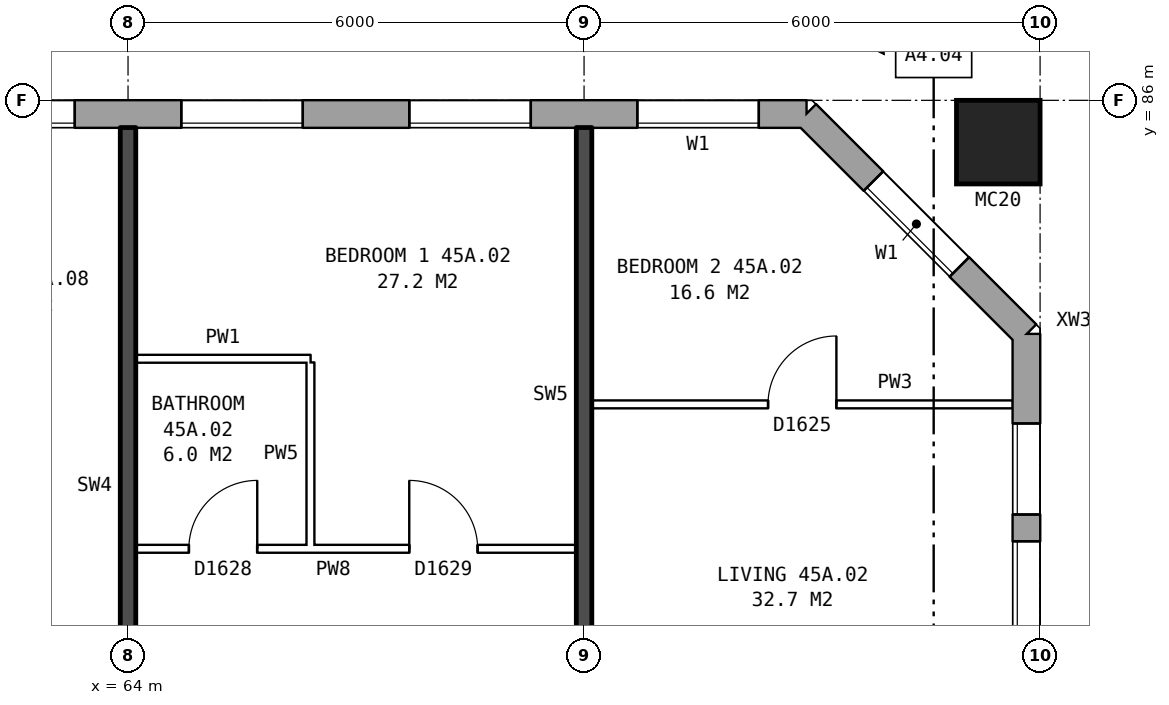
"""IFC4 building model, lengths in metres.
Left out: names, types, materials, properties, quantities, classifications, styles, units other than length and angle.
Written with IfcOpenShell. Run it as: python <this file> out.ifc"""

import sys

from ifc_helpers import new_model, si_unit, direction, frame, frame_2d, origin, origin_2d, place, context, subcontext, project, spatial, rectangle, hollow_rectangle, extrude, element, fill, save


model = new_model("IFC4")
c1 = context("Model", 3, precision=1e-05, world=origin(), true_north=direction((0.0, 1.0)))
c2 = subcontext(c1, "Body", "Model", "MODEL_VIEW")
j1 = project(units=[si_unit("LENGTHUNIT", "METRE"), si_unit("PLANEANGLEUNIT", "RADIAN")], contexts=[c1])
p1 = place(None, origin())
s1 = spatial("IfcSite", under=j1, at=p1, CompositionType="ELEMENT")
p2 = place(p1, origin())
s2 = spatial("IfcBuilding", under=s1, at=p2, CompositionType="ELEMENT")
p3 = place(p2, frame((0.0, 0.0, 160.9)))
s3 = spatial("IfcBuildingStorey", under=s2, at=p3, CompositionType="ELEMENT", Elevation=160.9)
p4 = place(p3, frame((75.45, 85.45, 0.0), z_axis=(0.0, 0.0, 1.0), x_axis=(1.0, 0.0, 0.0)))
e1 = element("IfcColumn", 1, at=p4, inside=s3, PredefinedType="COLUMN", context=c2, shape_type="SweptSolid", body=[
    extrude(hollow_rectangle(XDim=1.1, YDim=1.1, WallThickness=0.06, at=origin_2d()), origin(), (0.0, 0.0, 1.0), 3.1),
])
p5 = place(p3, frame((75.82, 57.075, 0.0), z_axis=(0.0, 0.0, 1.0), x_axis=(0.0, 1.0, 0.0)))
e2 = element("IfcWall", 2, at=p5, inside=s3, PredefinedType="STANDARD", context=c2, shape_type="SweptSolid", body=[
    extrude(rectangle(XDim=25.851, YDim=0.36, at=frame_2d((12.925, 0.0))), origin(), (0.0, 0.0, 1.0), 2.85),
])
p6 = place(p5, frame((1.075, 0.0, 0.8)))
e3 = element("IfcOpeningElement", 3, at=p6, cuts=e2, PredefinedType="OPENING", context=c2, shape_type="SweptSolid", body=[
    extrude(rectangle(XDim=1.2, YDim=1.8, at=frame_2d((0.6, 0.9))), frame((0.0, 0.19, 0.0), z_axis=(0.0, -1.0, 0.0), x_axis=(1.0, 0.0, 0.0)), (0.0, 0.0, 1.0), 0.38),
])
p7 = place(p5, frame((2.575, 0.0, 0.8)))
e4 = element("IfcOpeningElement", 4, at=p7, cuts=e2, PredefinedType="OPENING", context=c2, shape_type="SweptSolid", body=[
    extrude(rectangle(XDim=1.2, YDim=0.9, at=frame_2d((0.6, 0.45))), frame((0.0, 0.19, 0.0), z_axis=(0.0, -1.0, 0.0), x_axis=(1.0, 0.0, 0.0)), (0.0, 0.0, 1.0), 0.38),
])
p8 = place(p5, frame((19.475, 0.0, 1.7)))
e5 = element("IfcOpeningElement", 5, at=p8, cuts=e2, PredefinedType="OPENING", context=c2, shape_type="SweptSolid", body=[
    extrude(rectangle(XDim=1.4, YDim=0.9, at=frame_2d((0.7, 0.45))), frame((0.0, 0.19, 0.0), z_axis=(0.0, -1.0, 0.0), x_axis=(1.0, 0.0, 0.0)), (0.0, 0.0, 1.0), 0.38),
])
p9 = place(p5, frame((21.925, 0.0, 0.8)))
e6 = element("IfcOpeningElement", 6, at=p9, cuts=e2, PredefinedType="OPENING", context=c2, shape_type="SweptSolid", body=[
    extrude(rectangle(XDim=1.2, YDim=0.9, at=frame_2d((0.6, 0.45))), frame((0.0, 0.19, 0.0), z_axis=(0.0, -1.0, 0.0), x_axis=(1.0, 0.0, 0.0)), (0.0, 0.0, 1.0), 0.38),
])
p10 = place(p5, frame((4.975, 0.0, 1.7)))
e7 = element("IfcOpeningElement", 7, at=p10, cuts=e2, PredefinedType="OPENING", context=c2, shape_type="SweptSolid", body=[
    extrude(rectangle(XDim=1.4, YDim=0.9, at=frame_2d((0.7, 0.45))), frame((0.0, 0.19, 0.0), z_axis=(0.0, -1.0, 0.0), x_axis=(1.0, 0.0, 0.0)), (0.0, 0.0, 1.0), 0.38),
])
p11 = place(p5, frame((23.475, 0.0, 0.8)))
e8 = element("IfcOpeningElement", 8, at=p11, cuts=e2, PredefinedType="OPENING", context=c2, shape_type="SweptSolid", body=[
    extrude(rectangle(XDim=1.2, YDim=1.8, at=frame_2d((0.6, 0.9))), frame((0.0, 0.19, 0.0), z_axis=(0.0, -1.0, 0.0), x_axis=(1.0, 0.0, 0.0)), (0.0, 0.0, 1.0), 0.38),
])
p12 = place(p3, frame((75.82, 82.925, 0.0), z_axis=(0.0, 0.0, 1.0), x_axis=(-0.707106781187, 0.707106781187, 0.0)))
e9 = element("IfcWall", 9, at=p12, inside=s3, PredefinedType="STANDARD", context=c2, shape_type="SweptSolid", body=[
    extrude(rectangle(XDim=4.094, YDim=0.36, at=frame_2d((2.047, 0.0))), origin(), (0.0, 0.0, 1.0), 2.85),
])
p13 = place(p12, frame((1.247, 0.0, 0.8)))
e10 = element("IfcOpeningElement", 10, at=p13, cuts=e9, PredefinedType="OPENING", context=c2, shape_type="SweptSolid", body=[
    extrude(rectangle(XDim=1.6, YDim=1.8, at=frame_2d((0.8, 0.9))), frame((0.0, 0.19, 0.0), z_axis=(0.0, -1.0, 0.0), x_axis=(1.0, 0.0, 0.0)), (0.0, 0.0, 1.0), 0.38),
])
p14 = place(p3, frame((72.925, 85.82, 0.0), z_axis=(0.0, 0.0, 1.0), x_axis=(-1.0, 0.0, 0.0)))
e11 = element("IfcWall", 11, at=p14, inside=s3, PredefinedType="STANDARD", context=c2, shape_type="SweptSolid", body=[
    extrude(rectangle(XDim=41.351, YDim=0.36, at=frame_2d((20.675, 0.0))), origin(), (0.0, 0.0, 1.0), 2.85),
])
p15 = place(p14, frame((0.625, 0.0, 0.8)))
e12 = element("IfcOpeningElement", 12, at=p15, cuts=e11, PredefinedType="OPENING", context=c2, shape_type="SweptSolid", body=[
    extrude(rectangle(XDim=1.6, YDim=1.8, at=frame_2d((0.8, 0.9))), frame((0.0, 0.19, 0.0), z_axis=(0.0, -1.0, 0.0), x_axis=(1.0, 0.0, 0.0)), (0.0, 0.0, 1.0), 0.38),
])
p16 = place(p14, frame((3.625, 0.0, 0.8)))
e13 = element("IfcOpeningElement", 13, at=p16, cuts=e11, PredefinedType="OPENING", context=c2, shape_type="SweptSolid", body=[
    extrude(rectangle(XDim=1.6, YDim=1.8, at=frame_2d((0.8, 0.9))), frame((0.0, 0.19, 0.0), z_axis=(0.0, -1.0, 0.0), x_axis=(1.0, 0.0, 0.0)), (0.0, 0.0, 1.0), 0.38),
])
p17 = place(p14, frame((6.625, 0.0, 0.8)))
e14 = element("IfcOpeningElement", 14, at=p17, cuts=e11, PredefinedType="OPENING", context=c2, shape_type="SweptSolid", body=[
    extrude(rectangle(XDim=1.6, YDim=1.8, at=frame_2d((0.8, 0.9))), frame((0.0, 0.19, 0.0), z_axis=(0.0, -1.0, 0.0), x_axis=(1.0, 0.0, 0.0)), (0.0, 0.0, 1.0), 0.38),
])
p18 = place(p14, frame((9.625, 0.0, 0.8)))
e15 = element("IfcOpeningElement", 15, at=p18, cuts=e11, PredefinedType="OPENING", context=c2, shape_type="SweptSolid", body=[
    extrude(rectangle(XDim=1.6, YDim=1.8, at=frame_2d((0.8, 0.9))), frame((0.0, 0.19, 0.0), z_axis=(0.0, -1.0, 0.0), x_axis=(1.0, 0.0, 0.0)), (0.0, 0.0, 1.0), 0.38),
])
p19 = place(p14, frame((12.075, 0.0, 0.8)))
e16 = element("IfcOpeningElement", 16, at=p19, cuts=e11, PredefinedType="OPENING", context=c2, shape_type="SweptSolid", body=[
    extrude(rectangle(XDim=1.6, YDim=1.8, at=frame_2d((0.8, 0.9))), frame((0.0, 0.19, 0.0), z_axis=(0.0, -1.0, 0.0), x_axis=(1.0, 0.0, 0.0)), (0.0, 0.0, 1.0), 0.38),
])
p20 = place(p14, frame((15.375, 0.0, 0.25)))
e17 = element("IfcOpeningElement", 17, at=p20, cuts=e11, PredefinedType="OPENING", context=c2, shape_type="SweptSolid", body=[
    extrude(rectangle(XDim=0.8, YDim=0.9, at=frame_2d((0.4, 0.45))), frame((0.0, 0.19, 0.0), z_axis=(0.0, -1.0, 0.0), x_axis=(1.0, 0.0, 0.0)), (0.0, 0.0, 1.0), 0.38),
])
p21 = place(p14, frame((18.625, 0.0, 0.8)))
e18 = element("IfcOpeningElement", 18, at=p21, cuts=e11, PredefinedType="OPENING", context=c2, shape_type="SweptSolid", body=[
    extrude(rectangle(XDim=1.6, YDim=1.8, at=frame_2d((0.8, 0.9))), frame((0.0, 0.19, 0.0), z_axis=(0.0, -1.0, 0.0), x_axis=(1.0, 0.0, 0.0)), (0.0, 0.0, 1.0), 0.38),
])
p22 = place(p14, frame((21.625, 0.0, 0.8)))
e19 = element("IfcOpeningElement", 19, at=p22, cuts=e11, PredefinedType="OPENING", context=c2, shape_type="SweptSolid", body=[
    extrude(rectangle(XDim=1.6, YDim=1.8, at=frame_2d((0.8, 0.9))), frame((0.0, 0.19, 0.0), z_axis=(0.0, -1.0, 0.0), x_axis=(1.0, 0.0, 0.0)), (0.0, 0.0, 1.0), 0.38),
])
p23 = place(p14, frame((24.075, 0.0, 0.35)))
e20 = element("IfcOpeningElement", 20, at=p23, cuts=e11, PredefinedType="OPENING", context=c2, shape_type="SweptSolid", body=[
    extrude(rectangle(XDim=1.0, YDim=1.5, at=frame_2d((0.5, 0.75))), frame((0.0, 0.19, 0.0), z_axis=(0.0, -1.0, 0.0), x_axis=(1.0, 0.0, 0.0)), (0.0, 0.0, 1.0), 0.38),
])
p24 = place(p14, frame((27.625, 0.0, 0.8)))
e21 = element("IfcOpeningElement", 21, at=p24, cuts=e11, PredefinedType="OPENING", context=c2, shape_type="SweptSolid", body=[
    extrude(rectangle(XDim=1.6, YDim=1.8, at=frame_2d((0.8, 0.9))), frame((0.0, 0.19, 0.0), z_axis=(0.0, -1.0, 0.0), x_axis=(1.0, 0.0, 0.0)), (0.0, 0.0, 1.0), 0.38),
])
p25 = place(p14, frame((30.625, 0.0, 0.8)))
e22 = element("IfcOpeningElement", 22, at=p25, cuts=e11, PredefinedType="OPENING", context=c2, shape_type="SweptSolid", body=[
    extrude(rectangle(XDim=1.6, YDim=1.8, at=frame_2d((0.8, 0.9))), frame((0.0, 0.19, 0.0), z_axis=(0.0, -1.0, 0.0), x_axis=(1.0, 0.0, 0.0)), (0.0, 0.0, 1.0), 0.38),
])
p26 = place(p14, frame((33.625, 0.0, 0.8)))
e23 = element("IfcOpeningElement", 23, at=p26, cuts=e11, PredefinedType="OPENING", context=c2, shape_type="SweptSolid", body=[
    extrude(rectangle(XDim=1.6, YDim=1.8, at=frame_2d((0.8, 0.9))), frame((0.0, 0.19, 0.0), z_axis=(0.0, -1.0, 0.0), x_axis=(1.0, 0.0, 0.0)), (0.0, 0.0, 1.0), 0.38),
])
p27 = place(p14, frame((36.625, 0.0, 0.8)))
e24 = element("IfcOpeningElement", 24, at=p27, cuts=e11, PredefinedType="OPENING", context=c2, shape_type="SweptSolid", body=[
    extrude(rectangle(XDim=1.6, YDim=1.8, at=frame_2d((0.8, 0.9))), frame((0.0, 0.19, 0.0), z_axis=(0.0, -1.0, 0.0), x_axis=(1.0, 0.0, 0.0)), (0.0, 0.0, 1.0), 0.38),
])
p28 = place(p14, frame((13.975, 0.0, 1.5)))
e25 = element("IfcOpeningElement", 25, at=p28, cuts=e11, PredefinedType="OPENING", context=c2, shape_type="SweptSolid", body=[
    extrude(rectangle(XDim=0.6, YDim=0.9, at=frame_2d((0.3, 0.45))), frame((0.0, 0.19, 0.0), z_axis=(0.0, -1.0, 0.0), x_axis=(1.0, 0.0, 0.0)), (0.0, 0.0, 1.0), 0.38),
])
p29 = place(p14, frame((16.525, 0.0, 0.25)))
e26 = element("IfcOpeningElement", 26, at=p29, cuts=e11, PredefinedType="OPENING", context=c2, shape_type="SweptSolid", body=[
    extrude(rectangle(XDim=1.2, YDim=1.8, at=frame_2d((0.6, 0.9))), frame((0.0, 0.19, 0.0), z_axis=(0.0, -1.0, 0.0), x_axis=(1.0, 0.0, 0.0)), (0.0, 0.0, 1.0), 0.38),
])
p30 = place(p14, frame((25.375, 0.0, 0.25)))
e27 = element("IfcOpeningElement", 27, at=p30, cuts=e11, PredefinedType="OPENING", context=c2, shape_type="SweptSolid", body=[
    extrude(rectangle(XDim=0.6, YDim=0.9, at=frame_2d((0.3, 0.45))), frame((0.0, 0.19, 0.0), z_axis=(0.0, -1.0, 0.0), x_axis=(1.0, 0.0, 0.0)), (0.0, 0.0, 1.0), 0.38),
])
p31 = place(p3, frame((64.1, 80.1, 0.0), z_axis=(0.0, 0.0, 1.0), x_axis=(1.0, 0.0, 0.0)))
e28 = element("IfcWall", 28, at=p31, inside=s3, PredefinedType="PARTITIONING", context=c2, shape_type="SweptSolid", body=[
    extrude(rectangle(XDim=5.8, YDim=0.1, at=frame_2d((2.9, 0.0))), origin(), (0.0, 0.0, 1.0), 2.85),
])
p32 = place(p31, frame((3.6, 0.0, 0.0)))
e29 = element("IfcOpeningElement", 29, at=p32, cuts=e28, PredefinedType="OPENING", context=c2, shape_type="SweptSolid", body=[
    extrude(rectangle(XDim=0.9, YDim=2.1, at=frame_2d((0.45, 1.05))), frame((0.0, 0.06, 0.0), z_axis=(0.0, -1.0, 0.0), x_axis=(1.0, 0.0, 0.0)), (0.0, 0.0, 1.0), 0.12),
])
p33 = place(p31, frame((0.7, 0.0, 0.0)))
e30 = element("IfcOpeningElement", 30, at=p33, cuts=e28, PredefinedType="OPENING", context=c2, shape_type="SweptSolid", body=[
    extrude(rectangle(XDim=0.9, YDim=2.1, at=frame_2d((0.45, 1.05))), frame((0.0, 0.06, 0.0), z_axis=(0.0, -1.0, 0.0), x_axis=(1.0, 0.0, 0.0)), (0.0, 0.0, 1.0), 0.12),
])
p34 = place(p3, frame((70.1, 82.0, 0.0), z_axis=(0.0, 0.0, 1.0), x_axis=(1.0, 0.0, 0.0)))
e31 = element("IfcWall", 31, at=p34, inside=s3, PredefinedType="PARTITIONING", context=c2, shape_type="SweptSolid", body=[
    extrude(rectangle(XDim=5.54, YDim=0.1, at=frame_2d((2.77, 0.0))), origin(), (0.0, 0.0, 1.0), 2.85),
])
p35 = place(p34, frame((2.32, 0.0, 0.0)))
e32 = element("IfcOpeningElement", 32, at=p35, cuts=e31, PredefinedType="OPENING", context=c2, shape_type="SweptSolid", body=[
    extrude(rectangle(XDim=0.9, YDim=2.1, at=frame_2d((0.45, 1.05))), frame((0.0, 0.06, 0.0), z_axis=(0.0, -1.0, 0.0), x_axis=(1.0, 0.0, 0.0)), (0.0, 0.0, 1.0), 0.12),
])
p36 = place(p3, frame((64.1, 82.6, 0.0), z_axis=(0.0, 0.0, 1.0), x_axis=(1.0, 0.0, 0.0)))
e33 = element("IfcWall", 33, at=p36, inside=s3, PredefinedType="PARTITIONING", context=c2, shape_type="SweptSolid", body=[
    extrude(rectangle(XDim=2.3, YDim=0.1, at=frame_2d((1.15, 0.0))), origin(), (0.0, 0.0, 1.0), 2.85),
])
p37 = place(p3, frame((64.0, 76.2, 0.0), z_axis=(0.0, 0.0, 1.0), x_axis=(0.0, 1.0, 0.0)))
e34 = element("IfcWall", 34, at=p37, inside=s3, PredefinedType="SOLIDWALL", context=c2, shape_type="SweptSolid", body=[
    extrude(rectangle(XDim=9.44, YDim=0.2, at=frame_2d((4.72, 0.0))), origin(), (0.0, 0.0, 1.0), 2.85),
])
p38 = place(p3, frame((66.4, 80.15, 0.0), z_axis=(0.0, 0.0, 1.0), x_axis=(0.0, 1.0, 0.0)))
e35 = element("IfcWall", 35, at=p38, inside=s3, PredefinedType="PARTITIONING", context=c2, shape_type="SweptSolid", body=[
    extrude(rectangle(XDim=2.4, YDim=0.1, at=frame_2d((1.2, 0.0))), origin(), (0.0, 0.0, 1.0), 2.85),
])
p39 = place(p3, frame((70.0, 76.2, 0.0), z_axis=(0.0, 0.0, 1.0), x_axis=(0.0, 1.0, 0.0)))
e36 = element("IfcWall", 36, at=p39, inside=s3, PredefinedType="SOLIDWALL", context=c2, shape_type="SweptSolid", body=[
    extrude(rectangle(XDim=9.44, YDim=0.2, at=frame_2d((4.72, 0.0))), origin(), (0.0, 0.0, 1.0), 2.85),
])
p40 = place(p39, frame((1.5, 0.0, 0.0)))
e37 = element("IfcOpeningElement", 37, at=p40, cuts=e36, PredefinedType="OPENING", context=c2, shape_type="SweptSolid", body=[
    extrude(rectangle(XDim=0.9, YDim=2.1, at=frame_2d((0.45, 1.05))), frame((0.0, 0.11, 0.0), z_axis=(0.0, -1.0, 0.0), x_axis=(1.0, 0.0, 0.0)), (0.0, 0.0, 1.0), 0.22),
])
p41 = place(p9, origin())
e38 = element("IfcWindow", 38, at=p41, inside=s3, PartitioningType="SINGLE_PANEL", PredefinedType="WINDOW", context=c2, shape_type="SweptSolid", body=[
    extrude(rectangle(XDim=1.2, YDim=0.9, at=frame_2d((0.6, 0.45))), frame((0.0, 0.15, 0.0), z_axis=(0.0, -1.0, 0.0), x_axis=(1.0, 0.0, 0.0)), (0.0, 0.0, 1.0), 0.06),
])
fill(e6, e38)
p42 = place(p13, origin())
e39 = element("IfcWindow", 39, at=p42, inside=s3, PartitioningType="SINGLE_PANEL", PredefinedType="WINDOW", context=c2, shape_type="SweptSolid", body=[
    extrude(rectangle(XDim=1.6, YDim=1.8, at=frame_2d((0.8, 0.9))), frame((0.0, 0.15, 0.0), z_axis=(0.0, -1.0, 0.0), x_axis=(1.0, 0.0, 0.0)), (0.0, 0.0, 1.0), 0.06),
])
fill(e10, e39)
p43 = place(p15, origin())
e40 = element("IfcWindow", 40, at=p43, inside=s3, PartitioningType="SINGLE_PANEL", PredefinedType="WINDOW", context=c2, shape_type="SweptSolid", body=[
    extrude(rectangle(XDim=1.6, YDim=1.8, at=frame_2d((0.8, 0.9))), frame((0.0, 0.15, 0.0), z_axis=(0.0, -1.0, 0.0), x_axis=(1.0, 0.0, 0.0)), (0.0, 0.0, 1.0), 0.06),
])
fill(e12, e40)
p44 = place(p16, origin())
e41 = element("IfcWindow", 41, at=p44, inside=s3, PartitioningType="SINGLE_PANEL", PredefinedType="WINDOW", context=c2, shape_type="SweptSolid", body=[
    extrude(rectangle(XDim=1.6, YDim=1.8, at=frame_2d((0.8, 0.9))), frame((0.0, 0.15, 0.0), z_axis=(0.0, -1.0, 0.0), x_axis=(1.0, 0.0, 0.0)), (0.0, 0.0, 1.0), 0.06),
])
fill(e13, e41)
p45 = place(p17, origin())
e42 = element("IfcWindow", 42, at=p45, inside=s3, PartitioningType="SINGLE_PANEL", PredefinedType="WINDOW", context=c2, shape_type="SweptSolid", body=[
    extrude(rectangle(XDim=1.6, YDim=1.8, at=frame_2d((0.8, 0.9))), frame((0.0, 0.15, 0.0), z_axis=(0.0, -1.0, 0.0), x_axis=(1.0, 0.0, 0.0)), (0.0, 0.0, 1.0), 0.06),
])
fill(e14, e42)
p46 = place(p18, origin())
e43 = element("IfcWindow", 43, at=p46, inside=s3, PartitioningType="SINGLE_PANEL", PredefinedType="WINDOW", context=c2, shape_type="SweptSolid", body=[
    extrude(rectangle(XDim=1.6, YDim=1.8, at=frame_2d((0.8, 0.9))), frame((0.0, 0.15, 0.0), z_axis=(0.0, -1.0, 0.0), x_axis=(1.0, 0.0, 0.0)), (0.0, 0.0, 1.0), 0.06),
])
fill(e15, e43)
p47 = place(p32, origin())
e44 = element("IfcDoor", 44, at=p47, inside=s3, OperationType="SINGLE_SWING_LEFT", PredefinedType="DOOR", context=c2, shape_type="SweptSolid", body=[
    extrude(rectangle(XDim=0.9, YDim=2.1, at=frame_2d((0.45, 1.05))), frame((0.0, 0.025, 0.0), z_axis=(0.0, -1.0, 0.0), x_axis=(1.0, 0.0, 0.0)), (0.0, 0.0, 1.0), 0.05),
])
fill(e29, e44)
p48 = place(p35, origin())
e45 = element("IfcDoor", 45, at=p48, inside=s3, OperationType="SINGLE_SWING_RIGHT", PredefinedType="DOOR", context=c2, shape_type="SweptSolid", body=[
    extrude(rectangle(XDim=0.9, YDim=2.1, at=frame_2d((0.45, 1.05))), frame((0.0, 0.025, 0.0), z_axis=(0.0, -1.0, 0.0), x_axis=(1.0, 0.0, 0.0)), (0.0, 0.0, 1.0), 0.05),
])
fill(e32, e45)
p49 = place(p33, origin())
e46 = element("IfcDoor", 46, at=p49, inside=s3, OperationType="SINGLE_SWING_RIGHT", PredefinedType="DOOR", context=c2, shape_type="SweptSolid", body=[
    extrude(rectangle(XDim=0.9, YDim=2.1, at=frame_2d((0.45, 1.05))), frame((0.0, 0.025, 0.0), z_axis=(0.0, -1.0, 0.0), x_axis=(1.0, 0.0, 0.0)), (0.0, 0.0, 1.0), 0.05),
])
fill(e30, e46)
p50 = place(p11, origin())
e47 = element("IfcWindow", 47, at=p50, inside=s3, PartitioningType="SINGLE_PANEL", PredefinedType="WINDOW", context=c2, shape_type="SweptSolid", body=[
    extrude(rectangle(XDim=1.2, YDim=1.8, at=frame_2d((0.6, 0.9))), frame((0.0, 0.15, 0.0), z_axis=(0.0, -1.0, 0.0), x_axis=(1.0, 0.0, 0.0)), (0.0, 0.0, 1.0), 0.06),
])
fill(e8, e47)
save(model, sys.argv[1])
